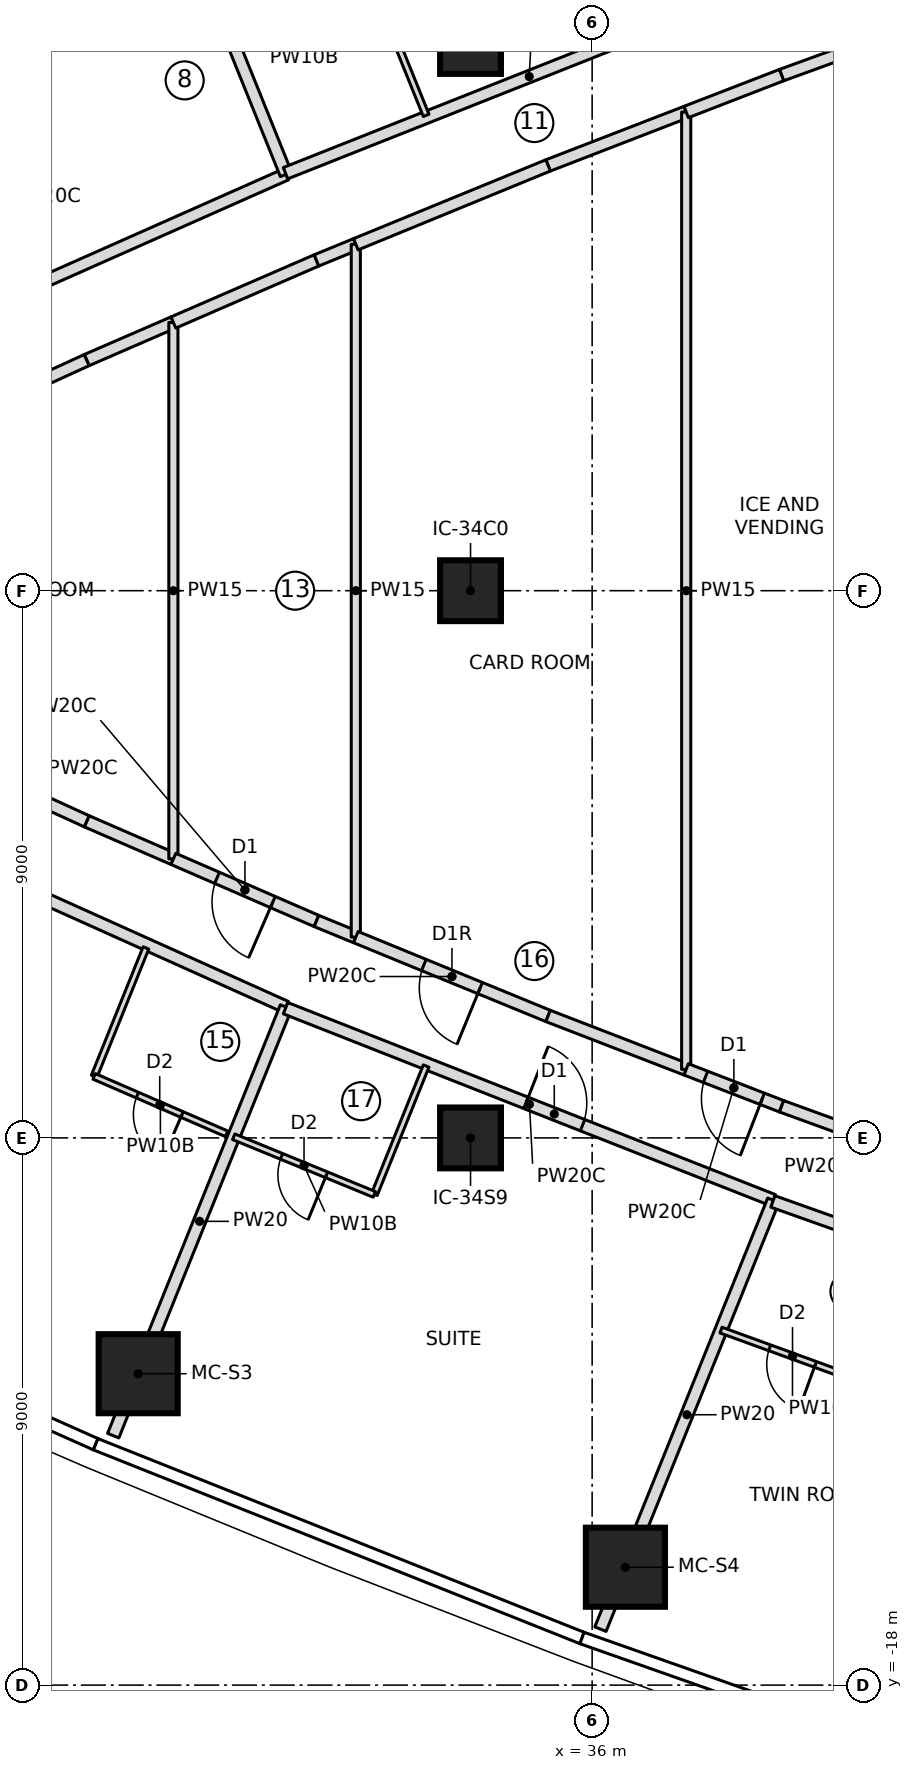
"""IFC4 building model, lengths in metres.
Left out: names, types, materials, properties, quantities, classifications, styles, units other than length and angle.
Written with IfcOpenShell. Run it as: python <this file> out.ifc"""

import sys

from ifc_helpers import new_model, si_unit, direction, frame, frame_2d, origin, origin_2d, place, context, subcontext, project, spatial, rectangle, extrude, element, fill, save


model = new_model("IFC4")
c1 = context("Model", 3, precision=1e-05, world=origin(), true_north=direction((0.0, 1.0)))
c2 = subcontext(c1, "Body", "Model", "MODEL_VIEW")
j1 = project(units=[si_unit("LENGTHUNIT", "METRE"), si_unit("PLANEANGLEUNIT", "RADIAN")], contexts=[c1])
p1 = place(None, origin())
s1 = spatial("IfcSite", under=j1, at=p1, CompositionType="ELEMENT")
p2 = place(p1, origin())
s2 = spatial("IfcBuilding", under=s1, at=p2, CompositionType="ELEMENT")
p3 = place(p2, frame((0.0, 0.0, 179.05)))
s3 = spatial("IfcBuildingStorey", under=s2, at=p3, CompositionType="ELEMENT", Elevation=179.05)
for number, where, z_axis, x_axis in (
    (1, (28.534, -12.878, 0.0), (0.0, 0.0, 1.0), (1.0, 0.0, 0.0)),
    (2, (36.547, -16.061, 0.0), (0.0, 0.0, 1.0), (1.0, 0.0, 0.0)),
):
    element("IfcColumn", number, at=place(p3, frame(where, z_axis=z_axis, x_axis=x_axis)), inside=s3, PredefinedType="COLUMN", context=c2, shape_type="SweptSolid", body=[
        extrude(rectangle(XDim=1.3, YDim=1.3, at=origin_2d()), origin(), (0.0, 0.0, 1.0), 3.55),
    ])
for number, where, z_axis, x_axis in (
    (3, (34.0, -9.0, 0.0), (0.0, 0.0, 1.0), (1.0, 0.0, 0.0)),
    (4, (34.0, 0.0, 0.0), (0.0, 0.0, 1.0), (1.0, 0.0, 0.0)),
    (5, (34.0, 9.0, 0.0), (0.0, 0.0, 1.0), (1.0, 0.0, 0.0)),
):
    element("IfcColumn", number, at=place(p3, frame(where, z_axis=z_axis, x_axis=x_axis)), inside=s3, PredefinedType="COLUMN", context=c2, shape_type="SweptSolid", body=[
        extrude(rectangle(XDim=1.0, YDim=1.0, at=origin_2d()), origin(), (0.0, 0.0, 1.0), 3.55),
    ])
p4 = place(p3, frame((23.085, 3.351, 0.0), z_axis=(0.0, 0.0, 1.0), x_axis=(0.914065936171, 0.405565610392, 0.0)))
e6 = element("IfcWall", 6, at=p4, inside=s3, PredefinedType="PARTITIONING", context=c2, shape_type="SweptSolid", body=[
    extrude(rectangle(XDim=8.622, YDim=0.2, at=frame_2d((4.311, 0.0))), origin(), (0.0, 0.0, 1.0), 3.25),
])
p5 = place(p4, frame((3.05, 0.0, 0.0)))
e7 = element("IfcOpeningElement", 7, at=p5, cuts=e6, PredefinedType="OPENING", context=c2, shape_type="SweptSolid", body=[
    extrude(rectangle(XDim=1.0, YDim=2.1, at=frame_2d((0.5, 1.05))), frame((0.0, 0.11, 0.0), z_axis=(0.0, -1.0, 0.0), x_axis=(1.0, 0.0, 0.0)), (0.0, 0.0, 1.0), 0.22),
])
p6 = place(p3, frame((30.965, 6.848, 0.0), z_axis=(0.0, 0.0, 1.0), x_axis=(-0.373876084216, 0.927478664796, 0.0)))
e8 = element("IfcWall", 8, at=p6, inside=s3, PredefinedType="PARTITIONING", context=c2, shape_type="SweptSolid", body=[
    extrude(rectangle(XDim=7.6, YDim=0.2, at=frame_2d((3.8, 0.0))), origin(), (0.0, 0.0, 1.0), 3.25),
])
p7 = place(p3, frame((38.972, 10.045, 0.0), z_axis=(0.0, 0.0, 1.0), x_axis=(-0.929554647243, -0.368684360651, 0.0)))
e9 = element("IfcWall", 9, at=p7, inside=s3, PredefinedType="PARTITIONING", context=c2, shape_type="SweptSolid", body=[
    extrude(rectangle(XDim=8.622, YDim=0.2, at=frame_2d((4.311, 0.0))), origin(), (0.0, 0.0, 1.0), 3.25),
])
p8 = place(p7, frame((0.35, 0.0, 0.0)))
e10 = element("IfcOpeningElement", 10, at=p8, cuts=e9, PredefinedType="OPENING", context=c2, shape_type="SweptSolid", body=[
    extrude(rectangle(XDim=1.0, YDim=2.1, at=frame_2d((0.5, 1.05))), frame((0.0, 0.11, 0.0), z_axis=(0.0, -1.0, 0.0), x_axis=(1.0, 0.0, 0.0)), (0.0, 0.0, 1.0), 0.22),
])
p9 = place(p3, frame((32.418, 9.93, 0.0), z_axis=(0.0, 0.0, 1.0), x_axis=(0.373847853912, -0.927490044219, 0.0)))
e11 = element("IfcWall", 11, at=p9, inside=s3, PredefinedType="PARTITIONING", context=c2, shape_type="SweptSolid", body=[
    extrude(rectangle(XDim=2.277, YDim=0.1, at=frame_2d((1.139, 0.0))), origin(), (0.0, 0.0, 1.0), 3.25),
])
p10 = place(p3, frame((21.704, -2.685, 0.0), z_axis=(0.0, 0.0, 1.0), x_axis=(0.912095082087, -0.409978732659, 0.0)))
e12 = element("IfcWall", 12, at=p10, inside=s3, PredefinedType="PARTITIONING", context=c2, shape_type="SweptSolid", body=[
    extrude(rectangle(XDim=10.154, YDim=0.2, at=frame_2d((5.077, 0.0))), origin(), (0.0, 0.0, 1.0), 3.25),
])
p11 = place(p10, frame((0.45, 0.0, 0.0)))
e13 = element("IfcOpeningElement", 13, at=p11, cuts=e12, PredefinedType="OPENING", context=c2, shape_type="SweptSolid", body=[
    extrude(rectangle(XDim=1.5, YDim=2.1, at=frame_2d((0.75, 1.05))), frame((0.0, 0.11, 0.0), z_axis=(0.0, -1.0, 0.0), x_axis=(1.0, 0.0, 0.0)), (0.0, 0.0, 1.0), 0.22),
])
p12 = place(p3, frame((27.81, -7.988, 0.0), z_axis=(0.0, 0.0, 1.0), x_axis=(0.373865727953, 0.927482839443, 0.0)))
e14 = element("IfcWall", 14, at=p12, inside=s3, PredefinedType="PARTITIONING", context=c2, shape_type="SweptSolid", body=[
    extrude(rectangle(XDim=2.278, YDim=0.1, at=frame_2d((1.139, 0.0))), origin(), (0.0, 0.0, 1.0), 3.25),
])
p13 = place(p3, frame((29.989, -8.933, 0.0), z_axis=(0.0, 0.0, 1.0), x_axis=(-0.917386792713, 0.397996824805, 0.0)))
e15 = element("IfcWall", 15, at=p13, inside=s3, PredefinedType="PARTITIONING", context=c2, shape_type="SweptSolid", body=[
    extrude(rectangle(XDim=2.375, YDim=0.1, at=frame_2d((1.188, 0.0))), origin(), (0.0, 0.0, 1.0), 3.25),
])
p14 = place(p13, frame((0.8, 0.0, 0.0)))
e16 = element("IfcOpeningElement", 16, at=p14, cuts=e15, PredefinedType="OPENING", context=c2, shape_type="SweptSolid", body=[
    extrude(rectangle(XDim=0.8, YDim=2.1, at=frame_2d((0.4, 1.05))), frame((0.0, 0.06, 0.0), z_axis=(0.0, -1.0, 0.0), x_axis=(1.0, 0.0, 0.0)), (0.0, 0.0, 1.0), 0.12),
])
p15 = place(p3, frame((28.124, -13.897, 0.0), z_axis=(0.0, 0.0, 1.0), x_axis=(0.373876084216, 0.927478664796, 0.0)))
e17 = element("IfcWall", 17, at=p15, inside=s3, PredefinedType="PARTITIONING", context=c2, shape_type="SweptSolid", body=[
    extrude(rectangle(XDim=7.6, YDim=0.2, at=frame_2d((3.8, 0.0))), origin(), (0.0, 0.0, 1.0), 3.25),
])
p16 = place(p3, frame((30.958, -6.866, 0.0), z_axis=(0.0, 0.0, 1.0), x_axis=(0.93040517394, -0.366532689274, 0.0)))
e18 = element("IfcWall", 18, at=p16, inside=s3, PredefinedType="PARTITIONING", context=c2, shape_type="SweptSolid", body=[
    extrude(rectangle(XDim=8.622, YDim=0.2, at=frame_2d((4.311, 0.0))), origin(), (0.0, 0.0, 1.0), 3.25),
])
p17 = place(p16, frame((4.25, 0.0, 0.0)))
e19 = element("IfcOpeningElement", 19, at=p17, cuts=e18, PredefinedType="OPENING", context=c2, shape_type="SweptSolid", body=[
    extrude(rectangle(XDim=1.0, YDim=2.1, at=frame_2d((0.5, 1.05))), frame((0.0, 0.11, 0.0), z_axis=(0.0, -1.0, 0.0), x_axis=(1.0, 0.0, 0.0)), (0.0, 0.0, 1.0), 0.22),
])
p18 = place(p3, frame((33.27, -7.818, 0.0), z_axis=(0.0, 0.0, 1.0), x_axis=(-0.373847853912, -0.927490044219, 0.0)))
e20 = element("IfcWall", 20, at=p18, inside=s3, PredefinedType="PARTITIONING", context=c2, shape_type="SweptSolid", body=[
    extrude(rectangle(XDim=2.277, YDim=0.1, at=frame_2d((1.139, 0.0))), origin(), (0.0, 0.0, 1.0), 3.25),
])
p19 = place(p3, frame((32.418, -9.93, 0.0), z_axis=(0.0, 0.0, 1.0), x_axis=(-0.92519499486, 0.379492057212, 0.0)))
e21 = element("IfcWall", 21, at=p19, inside=s3, PredefinedType="PARTITIONING", context=c2, shape_type="SweptSolid", body=[
    extrude(rectangle(XDim=2.5, YDim=0.1, at=frame_2d((1.25, 0.0))), origin(), (0.0, 0.0, 1.0), 3.25),
])
p20 = place(p19, frame((0.85, 0.0, 0.0)))
e22 = element("IfcOpeningElement", 22, at=p20, cuts=e21, PredefinedType="OPENING", context=c2, shape_type="SweptSolid", body=[
    extrude(rectangle(XDim=0.8, YDim=2.1, at=frame_2d((0.4, 1.05))), frame((0.0, 0.06, 0.0), z_axis=(0.0, -1.0, 0.0), x_axis=(1.0, 0.0, 0.0)), (0.0, 0.0, 1.0), 0.12),
])
p21 = place(p3, frame((36.137, -17.079, 0.0), z_axis=(0.0, 0.0, 1.0), x_axis=(0.373863662938, 0.927483671843, 0.0)))
e23 = element("IfcWall", 23, at=p21, inside=s3, PredefinedType="PARTITIONING", context=c2, shape_type="SweptSolid", body=[
    extrude(rectangle(XDim=7.604, YDim=0.2, at=frame_2d((3.802, 0.0))), origin(), (0.0, 0.0, 1.0), 3.25),
])
p22 = place(p3, frame((38.972, -10.045, 0.0), z_axis=(0.0, 0.0, 1.0), x_axis=(0.942220252757, -0.334994022773, 0.0)))
e24 = element("IfcWall", 24, at=p22, inside=s3, PredefinedType="PARTITIONING", context=c2, shape_type="SweptSolid", body=[
    extrude(rectangle(XDim=4.31, YDim=0.2, at=frame_2d((2.155, 0.0))), origin(), (0.0, 0.0, 1.0), 3.25),
])
p23 = place(p22, frame((3.05, 0.0, 0.0)))
e25 = element("IfcOpeningElement", 25, at=p23, cuts=e24, PredefinedType="OPENING", context=c2, shape_type="SweptSolid", body=[
    extrude(rectangle(XDim=1.0, YDim=2.1, at=frame_2d((0.5, 1.05))), frame((0.0, 0.11, 0.0), z_axis=(0.0, -1.0, 0.0), x_axis=(1.0, 0.0, 0.0)), (0.0, 0.0, 1.0), 0.22),
])
p24 = place(p3, frame((40.47, -13.016, 0.0), z_axis=(0.0, 0.0, 1.0), x_axis=(-0.939744972593, 0.341876273652, 0.0)))
e26 = element("IfcWall", 26, at=p24, inside=s3, PredefinedType="PARTITIONING", context=c2, shape_type="SweptSolid", body=[
    extrude(rectangle(XDim=2.501, YDim=0.1, at=frame_2d((1.251, 0.0))), origin(), (0.0, 0.0, 1.0), 3.25),
])
p25 = place(p24, frame((0.85, 0.0, 0.0)))
e27 = element("IfcOpeningElement", 27, at=p25, cuts=e26, PredefinedType="OPENING", context=c2, shape_type="SweptSolid", body=[
    extrude(rectangle(XDim=0.8, YDim=2.1, at=frame_2d((0.4, 1.05))), frame((0.0, 0.06, 0.0), z_axis=(0.0, -1.0, 0.0), x_axis=(1.0, 0.0, 0.0)), (0.0, 0.0, 1.0), 0.12),
])
p26 = place(p3, frame((27.69, -3.793, 0.0), z_axis=(0.0, 0.0, 1.0), x_axis=(-0.909180834404, 0.416401501382, 0.0)))
e28 = element("IfcWall", 28, at=p26, inside=s3, PredefinedType="PARTITIONING", context=c2, shape_type="SweptSolid", body=[
    extrude(rectangle(XDim=4.117, YDim=0.2, at=frame_2d((2.059, 0.0))), origin(), (0.0, 0.0, 1.0), 3.25),
])
p27 = place(p26, frame((1.559, 0.0, 0.0)))
e29 = element("IfcOpeningElement", 29, at=p27, cuts=e28, PredefinedType="OPENING", context=c2, shape_type="SweptSolid", body=[
    extrude(rectangle(XDim=1.0, YDim=2.1, at=frame_2d((0.5, 1.05))), frame((0.0, 0.11, 0.0), z_axis=(0.0, -1.0, 0.0), x_axis=(1.0, 0.0, 0.0)), (0.0, 0.0, 1.0), 0.22),
])
p28 = place(p3, frame((23.947, 2.079, 0.0), z_axis=(0.0, 0.0, 1.0), x_axis=(0.909180834404, 0.416401501382, 0.0)))
e30 = element("IfcWall", 30, at=p28, inside=s3, PredefinedType="PARTITIONING", context=c2, shape_type="SweptSolid", body=[
    extrude(rectangle(XDim=4.117, YDim=0.2, at=frame_2d((2.059, 0.0))), origin(), (0.0, 0.0, 1.0), 3.25),
])
for number, where, z_axis, x_axis in (
    (31, (27.69, 3.793, 0.0), (0.0, 0.0, 1.0), (0.917, 0.398, 0.0)),
    (32, (29.113, -4.411, 0.0), (0.0, 0.0, 1.0), (-0.917, 0.398, 0.0)),
):
    element("IfcWall", number, at=place(p3, frame(where, z_axis=z_axis, x_axis=x_axis)), inside=s3, PredefinedType="PARTITIONING", context=c2, shape_type="SweptSolid", body=[
        extrude(rectangle(XDim=1.552, YDim=0.2, at=frame_2d((0.776, 0.0))), origin(), (0.0, 0.0, 1.0), 3.25),
    ])
p29 = place(p3, frame((29.113, -4.411, 0.0), z_axis=(0.0, 0.0, 1.0), x_axis=(0.0, 1.0, 0.0)))
e33 = element("IfcWall", 33, at=p29, inside=s3, PredefinedType="PARTITIONING", context=c2, shape_type="SweptSolid", body=[
    extrude(rectangle(XDim=8.822, YDim=0.15, at=frame_2d((4.411, 0.0))), origin(), (0.0, 0.0, 1.0), 3.25),
])
p30 = place(p3, frame((31.467, -5.432, 0.0), z_axis=(0.0, 0.0, 1.0), x_axis=(-0.91737845263, 0.398016048231, 0.0)))
e34 = element("IfcWall", 34, at=p30, inside=s3, PredefinedType="PARTITIONING", context=c2, shape_type="SweptSolid", body=[
    extrude(rectangle(XDim=2.565, YDim=0.2, at=frame_2d((1.283, 0.0))), origin(), (0.0, 0.0, 1.0), 3.25),
])
p31 = place(p30, frame((0.783, 0.0, 0.0)))
e35 = element("IfcOpeningElement", 35, at=p31, cuts=e34, PredefinedType="OPENING", context=c2, shape_type="SweptSolid", body=[
    extrude(rectangle(XDim=1.0, YDim=2.1, at=frame_2d((0.5, 1.05))), frame((0.0, 0.11, 0.0), z_axis=(0.0, -1.0, 0.0), x_axis=(1.0, 0.0, 0.0)), (0.0, 0.0, 1.0), 0.22),
])
p32 = place(p3, frame((32.113, -5.697, 0.0), z_axis=(0.0, 0.0, 1.0), x_axis=(-0.92526293873, 0.379326368992, 0.0)))
e36 = element("IfcWall", 36, at=p32, inside=s3, PredefinedType="PARTITIONING", context=c2, shape_type="SweptSolid", body=[
    extrude(rectangle(XDim=0.699, YDim=0.2, at=frame_2d((0.35, 0.0))), origin(), (0.0, 0.0, 1.0), 3.25),
])
p33 = place(p3, frame((29.113, 4.411, 0.0), z_axis=(0.0, 0.0, 1.0), x_axis=(0.91737845263, 0.398016048231, 0.0)))
e37 = element("IfcWall", 37, at=p33, inside=s3, PredefinedType="PARTITIONING", context=c2, shape_type="SweptSolid", body=[
    extrude(rectangle(XDim=2.565, YDim=0.2, at=frame_2d((1.283, 0.0))), origin(), (0.0, 0.0, 1.0), 3.25),
])
p34 = place(p3, frame((31.467, 5.432, 0.0), z_axis=(0.0, 0.0, 1.0), x_axis=(0.92526293873, 0.379326368992, 0.0)))
e38 = element("IfcWall", 38, at=p34, inside=s3, PredefinedType="PARTITIONING", context=c2, shape_type="SweptSolid", body=[
    extrude(rectangle(XDim=0.699, YDim=0.2, at=frame_2d((0.35, 0.0))), origin(), (0.0, 0.0, 1.0), 3.25),
])
p35 = place(p3, frame((32.113, -5.697, 0.0), z_axis=(0.0, 0.0, 1.0), x_axis=(0.0, 1.0, 0.0)))
e39 = element("IfcWall", 39, at=p35, inside=s3, PredefinedType="PARTITIONING", context=c2, shape_type="SweptSolid", body=[
    extrude(rectangle(XDim=11.395, YDim=0.15, at=frame_2d((5.697, 0.0))), origin(), (0.0, 0.0, 1.0), 3.25),
])
p36 = place(p3, frame((35.276, -6.994, 0.0), z_axis=(0.0, 0.0, 1.0), x_axis=(-0.925194984271, 0.379492083026, 0.0)))
e40 = element("IfcWall", 40, at=p36, inside=s3, PredefinedType="PARTITIONING", context=c2, shape_type="SweptSolid", body=[
    extrude(rectangle(XDim=3.418, YDim=0.2, at=frame_2d((1.709, 0.0))), origin(), (0.0, 0.0, 1.0), 3.25),
])
p37 = place(p36, frame((1.209, 0.0, 0.0)))
e41 = element("IfcOpeningElement", 41, at=p37, cuts=e40, PredefinedType="OPENING", context=c2, shape_type="SweptSolid", body=[
    extrude(rectangle(XDim=1.0, YDim=2.1, at=frame_2d((0.5, 1.05))), frame((0.0, 0.11, 0.0), z_axis=(0.0, -1.0, 0.0), x_axis=(1.0, 0.0, 0.0)), (0.0, 0.0, 1.0), 0.22),
])
for number, where, z_axis, x_axis in (
    (42, (35.276, 6.994, 0.0), (0.0, 0.0, 1.0), (0.933, 0.361, 0.0)),
    (43, (37.547, -7.873, 0.0), (0.0, 0.0, 1.0), (-0.933, 0.361, 0.0)),
):
    element("IfcWall", number, at=place(p3, frame(where, z_axis=z_axis, x_axis=x_axis)), inside=s3, PredefinedType="PARTITIONING", context=c2, shape_type="SweptSolid", body=[
        extrude(rectangle(XDim=2.435, YDim=0.2, at=frame_2d((1.218, 0.0))), origin(), (0.0, 0.0, 1.0), 3.25),
    ])
p38 = place(p3, frame((32.113, 5.697, 0.0), z_axis=(0.0, 0.0, 1.0), x_axis=(0.925194984271, 0.379492083026, 0.0)))
e44 = element("IfcWall", 44, at=p38, inside=s3, PredefinedType="PARTITIONING", context=c2, shape_type="SweptSolid", body=[
    extrude(rectangle(XDim=3.418, YDim=0.2, at=frame_2d((1.709, 0.0))), origin(), (0.0, 0.0, 1.0), 3.25),
])
p39 = place(p3, frame((37.547, -7.873, 0.0), z_axis=(0.0, 0.0, 1.0), x_axis=(0.0, 1.0, 0.0)))
e45 = element("IfcWall", 45, at=p39, inside=s3, PredefinedType="PARTITIONING", context=c2, shape_type="SweptSolid", body=[
    extrude(rectangle(XDim=15.746, YDim=0.15, at=frame_2d((7.873, 0.0))), origin(), (0.0, 0.0, 1.0), 3.25),
])
p40 = place(p3, frame((39.115, -8.479, 0.0), z_axis=(0.0, 0.0, 1.0), x_axis=(-0.932670528514, 0.360729379511, 0.0)))
e46 = element("IfcWall", 46, at=p40, inside=s3, PredefinedType="PARTITIONING", context=c2, shape_type="SweptSolid", body=[
    extrude(rectangle(XDim=1.682, YDim=0.2, at=frame_2d((0.841, 0.0))), origin(), (0.0, 0.0, 1.0), 3.25),
])
p41 = place(p40, frame((0.341, 0.0, 0.0)))
e47 = element("IfcOpeningElement", 47, at=p41, cuts=e46, PredefinedType="OPENING", context=c2, shape_type="SweptSolid", body=[
    extrude(rectangle(XDim=1.0, YDim=2.1, at=frame_2d((0.5, 1.05))), frame((0.0, 0.11, 0.0), z_axis=(0.0, -1.0, 0.0), x_axis=(1.0, 0.0, 0.0)), (0.0, 0.0, 1.0), 0.22),
])
for number, where, z_axis, x_axis in (
    (48, (39.115, 8.479, 0.0), (0.0, 0.0, 1.0), (0.94, 0.342, 0.0)),
    (49, (40.547, -9.0, 0.0), (0.0, 0.0, 1.0), (-0.94, 0.342, 0.0)),
):
    element("IfcWall", number, at=place(p3, frame(where, z_axis=z_axis, x_axis=x_axis)), inside=s3, PredefinedType="PARTITIONING", context=c2, shape_type="SweptSolid", body=[
        extrude(rectangle(XDim=1.523, YDim=0.2, at=frame_2d((0.762, 0.0))), origin(), (0.0, 0.0, 1.0), 3.25),
    ])
p42 = place(p3, frame((37.547, 7.873, 0.0), z_axis=(0.0, 0.0, 1.0), x_axis=(0.932670528514, 0.360729379511, 0.0)))
e50 = element("IfcWall", 50, at=p42, inside=s3, PredefinedType="PARTITIONING", context=c2, shape_type="SweptSolid", body=[
    extrude(rectangle(XDim=1.682, YDim=0.2, at=frame_2d((0.841, 0.0))), origin(), (0.0, 0.0, 1.0), 3.25),
])
p43 = place(p14, origin())
e51 = element("IfcDoor", 51, at=p43, inside=s3, OperationType="SINGLE_SWING_LEFT", PredefinedType="DOOR", context=c2, shape_type="SweptSolid", body=[
    extrude(rectangle(XDim=0.8, YDim=2.1, at=frame_2d((0.4, 1.05))), frame((0.0, 0.025, 0.0), z_axis=(0.0, -1.0, 0.0), x_axis=(1.0, 0.0, 0.0)), (0.0, 0.0, 1.0), 0.05),
])
fill(e16, e51)
p44 = place(p20, origin())
e52 = element("IfcDoor", 52, at=p44, inside=s3, OperationType="SINGLE_SWING_LEFT", PredefinedType="DOOR", context=c2, shape_type="SweptSolid", body=[
    extrude(rectangle(XDim=0.8, YDim=2.1, at=frame_2d((0.4, 1.05))), frame((0.0, 0.025, 0.0), z_axis=(0.0, -1.0, 0.0), x_axis=(1.0, 0.0, 0.0)), (0.0, 0.0, 1.0), 0.05),
])
fill(e22, e52)
p45 = place(p17, origin())
e53 = element("IfcDoor", 53, at=p45, inside=s3, OperationType="SINGLE_SWING_LEFT", PredefinedType="DOOR", context=c2, shape_type="SweptSolid", body=[
    extrude(rectangle(XDim=1.0, YDim=2.1, at=frame_2d((0.5, 1.05))), frame((0.0, 0.025, 0.0), z_axis=(0.0, -1.0, 0.0), x_axis=(1.0, 0.0, 0.0)), (0.0, 0.0, 1.0), 0.05),
])
fill(e19, e53)
p46 = place(p25, origin())
e54 = element("IfcDoor", 54, at=p46, inside=s3, OperationType="SINGLE_SWING_LEFT", PredefinedType="DOOR", context=c2, shape_type="SweptSolid", body=[
    extrude(rectangle(XDim=0.8, YDim=2.1, at=frame_2d((0.4, 1.05))), frame((0.0, 0.025, 0.0), z_axis=(0.0, -1.0, 0.0), x_axis=(1.0, 0.0, 0.0)), (0.0, 0.0, 1.0), 0.05),
])
fill(e27, e54)
p47 = place(p31, origin())
e55 = element("IfcDoor", 55, at=p47, inside=s3, OperationType="SINGLE_SWING_LEFT", PredefinedType="DOOR", context=c2, shape_type="SweptSolid", body=[
    extrude(rectangle(XDim=1.0, YDim=2.1, at=frame_2d((0.5, 1.05))), frame((0.0, 0.025, 0.0), z_axis=(0.0, -1.0, 0.0), x_axis=(1.0, 0.0, 0.0)), (0.0, 0.0, 1.0), 0.05),
])
fill(e35, e55)
p48 = place(p37, origin())
e56 = element("IfcDoor", 56, at=p48, inside=s3, OperationType="SINGLE_SWING_RIGHT", PredefinedType="DOOR", context=c2, shape_type="SweptSolid", body=[
    extrude(rectangle(XDim=1.0, YDim=2.1, at=frame_2d((0.5, 1.05))), frame((0.0, 0.025, 0.0), z_axis=(0.0, -1.0, 0.0), x_axis=(1.0, 0.0, 0.0)), (0.0, 0.0, 1.0), 0.05),
])
fill(e41, e56)
p49 = place(p41, origin())
e57 = element("IfcDoor", 57, at=p49, inside=s3, OperationType="SINGLE_SWING_LEFT", PredefinedType="DOOR", context=c2, shape_type="SweptSolid", body=[
    extrude(rectangle(XDim=1.0, YDim=2.1, at=frame_2d((0.5, 1.05))), frame((0.0, 0.025, 0.0), z_axis=(0.0, -1.0, 0.0), x_axis=(1.0, 0.0, 0.0)), (0.0, 0.0, 1.0), 0.05),
])
fill(e47, e57)
save(model, sys.argv[1])
